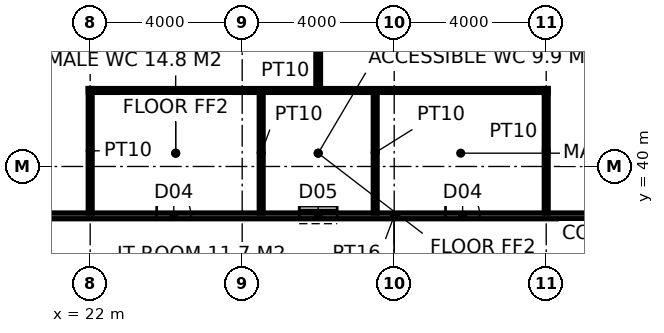
"""IFC4 building model, lengths in metres.
Left out: names, types, materials, properties, quantities, classifications, styles, units other than length and angle.
Written with IfcOpenShell. Run it as: python <this file> out.ifc"""

import sys

from ifc_helpers import new_model, si_unit, direction, frame, frame_2d, origin, place, context, subcontext, project, spatial, rectangle, extrude, element, fill, save


model = new_model("IFC4")
c1 = context("Model", 3, precision=1e-05, world=origin(), true_north=direction((0.0, 1.0)))
c2 = subcontext(c1, "Body", "Model", "MODEL_VIEW")
j1 = project(units=[si_unit("LENGTHUNIT", "METRE"), si_unit("PLANEANGLEUNIT", "RADIAN")], contexts=[c1])
p1 = place(None, origin())
s1 = spatial("IfcSite", under=j1, at=p1, CompositionType="ELEMENT")
p2 = place(p1, origin())
s2 = spatial("IfcBuilding", under=s1, at=p2, CompositionType="ELEMENT")
p3 = place(p2, frame((0.0, 0.0, 39.0)))
s3 = spatial("IfcBuildingStorey", under=s2, at=p3, CompositionType="ELEMENT", Elevation=39.0)
p4 = place(p3, frame((15.775, 38.7, 0.0), z_axis=(0.0, 0.0, 1.0), x_axis=(1.0, 0.0, 0.0)))
e1 = element("IfcWall", 1, at=p4, inside=s3, PredefinedType="PARTITIONING", context=c2, shape_type="SweptSolid", body=[
    extrude(rectangle(XDim=28.45, YDim=0.15, at=frame_2d((14.225, 0.0))), origin(), (0.0, 0.0, 1.0), 3.85),
])
p5 = place(p4, frame((7.975, 0.0, 0.0)))
e2 = element("IfcOpeningElement", 2, at=p5, cuts=e1, PredefinedType="OPENING", context=c2, shape_type="SweptSolid", body=[
    extrude(rectangle(XDim=0.9, YDim=2.1, at=frame_2d((0.45, 1.05))), frame((0.0, 0.085, 0.0), z_axis=(0.0, -1.0, 0.0), x_axis=(1.0, 0.0, 0.0)), (0.0, 0.0, 1.0), 0.17),
])
p6 = place(p4, frame((11.725, 0.0, 0.0)))
e3 = element("IfcOpeningElement", 3, at=p6, cuts=e1, PredefinedType="OPENING", context=c2, shape_type="SweptSolid", body=[
    extrude(rectangle(XDim=1.0, YDim=2.1, at=frame_2d((0.5, 1.05))), frame((0.0, 0.085, 0.0), z_axis=(0.0, -1.0, 0.0), x_axis=(1.0, 0.0, 0.0)), (0.0, 0.0, 1.0), 0.17),
])
p7 = place(p4, frame((15.575, 0.0, 0.0)))
e4 = element("IfcOpeningElement", 4, at=p7, cuts=e1, PredefinedType="OPENING", context=c2, shape_type="SweptSolid", body=[
    extrude(rectangle(XDim=0.9, YDim=2.1, at=frame_2d((0.45, 1.05))), frame((0.0, 0.085, 0.0), z_axis=(0.0, -1.0, 0.0), x_axis=(1.0, 0.0, 0.0)), (0.0, 0.0, 1.0), 0.17),
])
for number, where, z_axis, x_axis in (
    (5, (22.0, 38.775, 0.0), (0.0, 0.0, 1.0), (0.0, 1.0, 0.0)),
    (6, (34.0, 38.775, 0.0), (0.0, 0.0, 1.0), (0.0, 1.0, 0.0)),
):
    element("IfcWall", number, at=place(p3, frame(where, z_axis=z_axis, x_axis=x_axis)), inside=s3, PredefinedType="PARTITIONING", context=c2, shape_type="SweptSolid", body=[
        extrude(rectangle(XDim=3.275, YDim=0.1, at=frame_2d((1.638, 0.0))), origin(), (0.0, 0.0, 1.0), 2.65),
    ])
p8 = place(p3, frame((21.95, 42.0, 0.0), z_axis=(0.0, 0.0, 1.0), x_axis=(1.0, 0.0, 0.0)))
e7 = element("IfcWall", 7, at=p8, inside=s3, PredefinedType="PARTITIONING", context=c2, shape_type="SweptSolid", body=[
    extrude(rectangle(XDim=12.1, YDim=0.1, at=frame_2d((6.05, 0.0))), origin(), (0.0, 0.0, 1.0), 3.85),
])
for number, where, z_axis, x_axis in (
    (8, (26.5, 38.775, 0.0), (0.0, 0.0, 1.0), (0.0, 1.0, 0.0)),
    (9, (29.5, 38.775, 0.0), (0.0, 0.0, 1.0), (0.0, 1.0, 0.0)),
):
    element("IfcWall", number, at=place(p3, frame(where, z_axis=z_axis, x_axis=x_axis)), inside=s3, PredefinedType="PARTITIONING", context=c2, shape_type="SweptSolid", body=[
        extrude(rectangle(XDim=3.175, YDim=0.1, at=frame_2d((1.587, 0.0))), origin(), (0.0, 0.0, 1.0), 2.65),
    ])
p9 = place(p3, frame((28.0, 42.05, 0.0), z_axis=(0.0, 0.0, 1.0), x_axis=(0.0, 1.0, 0.0)))
e10 = element("IfcWall", 10, at=p9, inside=s3, PredefinedType="PARTITIONING", context=c2, shape_type="SweptSolid", body=[
    extrude(rectangle(XDim=1.65, YDim=0.12, at=frame_2d((0.825, 0.0))), origin(), (0.0, 0.0, 1.0), 3.85),
])
p10 = place(p5, origin())
e11 = element("IfcDoor", 11, at=p10, inside=s3, OperationType="SINGLE_SWING_LEFT", PredefinedType="DOOR", context=c2, shape_type="SweptSolid", body=[
    extrude(rectangle(XDim=0.9, YDim=2.1, at=frame_2d((0.45, 1.05))), frame((0.0, 0.025, 0.0), z_axis=(0.0, -1.0, 0.0), x_axis=(1.0, 0.0, 0.0)), (0.0, 0.0, 1.0), 0.05),
])
fill(e2, e11)
p11 = place(p6, origin())
e12 = element("IfcDoor", 12, at=p11, inside=s3, OperationType="SLIDING_TO_LEFT", PredefinedType="DOOR", context=c2, shape_type="SweptSolid", body=[
    extrude(rectangle(XDim=1.0, YDim=2.1, at=frame_2d((0.5, 1.05))), frame((0.0, 0.025, 0.0), z_axis=(0.0, -1.0, 0.0), x_axis=(1.0, 0.0, 0.0)), (0.0, 0.0, 1.0), 0.05),
])
fill(e3, e12)
p12 = place(p7, origin())
e13 = element("IfcDoor", 13, at=p12, inside=s3, OperationType="SINGLE_SWING_LEFT", PredefinedType="DOOR", context=c2, shape_type="SweptSolid", body=[
    extrude(rectangle(XDim=0.9, YDim=2.1, at=frame_2d((0.45, 1.05))), frame((0.0, 0.025, 0.0), z_axis=(0.0, -1.0, 0.0), x_axis=(1.0, 0.0, 0.0)), (0.0, 0.0, 1.0), 0.05),
])
fill(e4, e13)
save(model, sys.argv[1])
